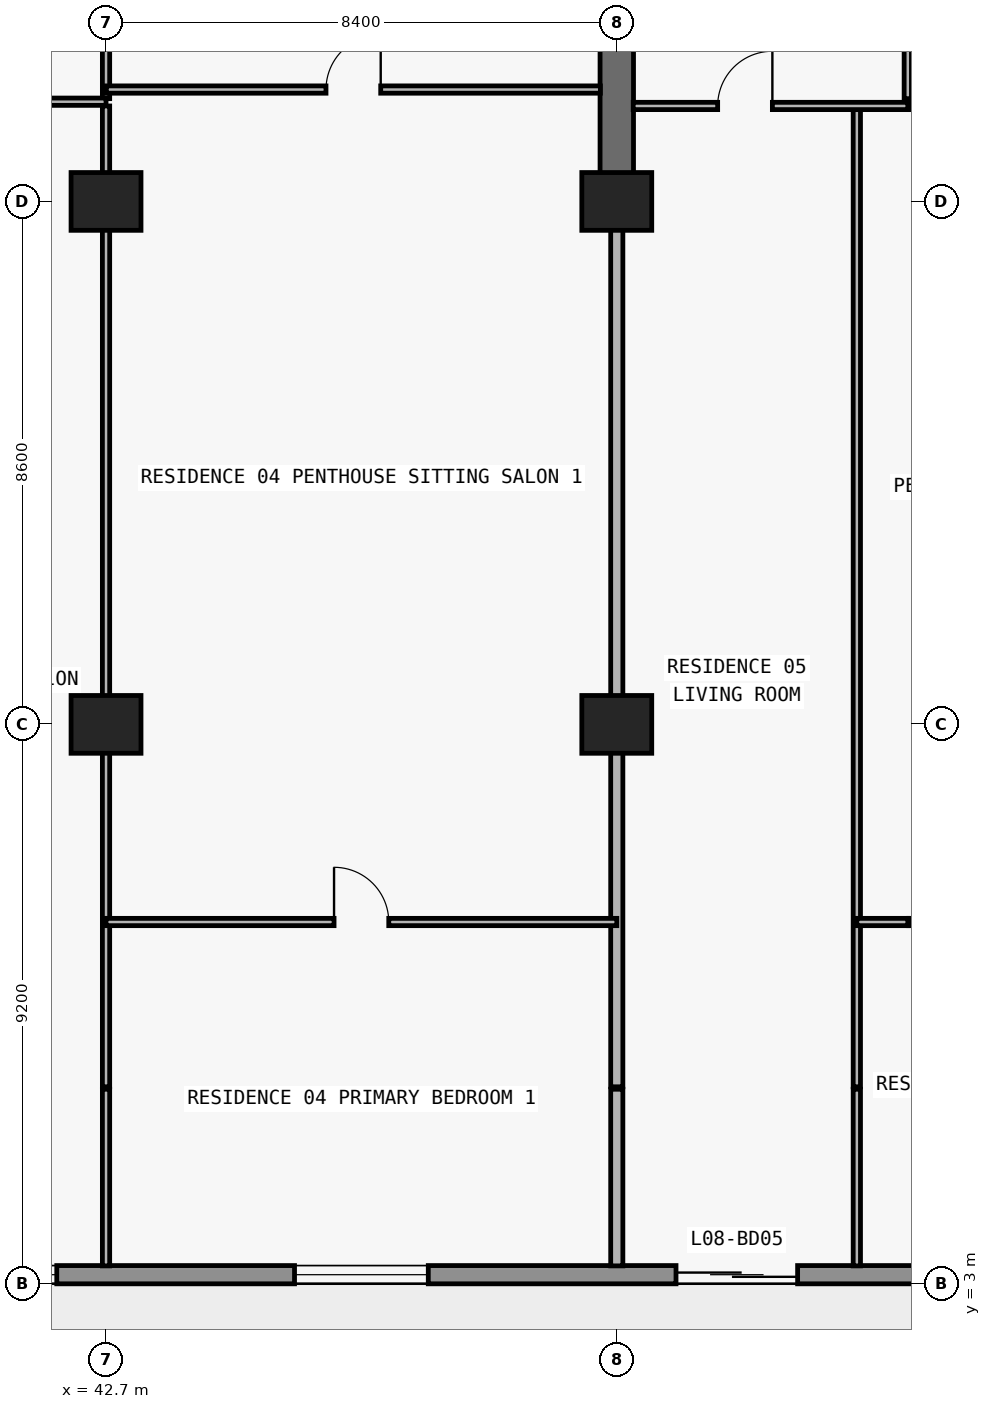
"""IFC4 building model, lengths in metres.
Left out: names, types, materials, properties, quantities, classifications, styles, units other than length and angle.
Written with IfcOpenShell. Run it as: python <this file> out.ifc"""

import sys

from ifc_helpers import new_model, si_unit, direction, frame, frame_2d, origin, origin_2d, place, context, subcontext, project, spatial, rectangle, extrude, element, fill, save


model = new_model("IFC4")
c1 = context("Model", 3, precision=1e-05, world=origin(), true_north=direction((0.0, 1.0)))
c2 = subcontext(c1, "Body", "Model", "MODEL_VIEW")
j1 = project(units=[si_unit("LENGTHUNIT", "METRE"), si_unit("PLANEANGLEUNIT", "RADIAN")], contexts=[c1])
p1 = place(None, origin())
s1 = spatial("IfcSite", under=j1, at=p1, CompositionType="ELEMENT")
p2 = place(p1, origin())
s2 = spatial("IfcBuilding", under=s1, at=p2, CompositionType="ELEMENT")
p3 = place(p2, frame((0.0, 0.0, 36.6)))
s3 = spatial("IfcBuildingStorey", under=s2, at=p3, CompositionType="ELEMENT", Elevation=36.6)
for number, where, z_axis, x_axis in (
    (1, (42.7, 12.2, 0.0), (0.0, 0.0, 1.0), (1.0, 0.0, 0.0)),
    (2, (51.1, 12.2, 0.0), (0.0, 0.0, 1.0), (1.0, 0.0, 0.0)),
    (3, (42.7, 20.8, 0.0), (0.0, 0.0, 1.0), (1.0, 0.0, 0.0)),
    (4, (51.1, 20.8, 0.0), (0.0, 0.0, 1.0), (1.0, 0.0, 0.0)),
):
    element("IfcColumn", number, at=place(p3, frame(where, z_axis=z_axis, x_axis=x_axis)), inside=s3, PredefinedType="COLUMN", context=c2, shape_type="SweptSolid", body=[
        extrude(rectangle(XDim=1.15, YDim=0.95, at=origin_2d()), origin(), (0.0, 0.0, 1.0), 3.05),
    ])
p4 = place(p3, frame((51.1, 20.8, 0.0), z_axis=(0.0, 0.0, 1.0), x_axis=(0.0, 1.0, 0.0)))
e5 = element("IfcWall", 5, at=p4, inside=s3, PredefinedType="SHEAR", context=c2, shape_type="SweptSolid", body=[
    extrude(rectangle(XDim=8.6, YDim=0.55, at=frame_2d((4.3, 0.0))), origin(), (0.0, 0.0, 1.0), 3.05),
])
p5 = place(p3, frame((72.7, 3.15, 0.0), z_axis=(0.0, 0.0, 1.0), x_axis=(-1.0, 0.0, 0.0)))
e6 = element("IfcWall", 6, at=p5, inside=s3, PredefinedType="STANDARD", context=c2, shape_type="SweptSolid", body=[
    extrude(rectangle(XDim=67.6, YDim=0.3, at=frame_2d((33.8, 0.0))), origin(), (0.0, 0.0, 1.0), 3.05),
])
p6 = place(p5, frame((59.826, 0.0, 0.0)))
e7 = element("IfcOpeningElement", 7, at=p6, cuts=e6, PredefinedType="OPENING", context=c2, shape_type="SweptSolid", body=[
    extrude(rectangle(XDim=2.0, YDim=2.3, at=frame_2d((1.0, 1.15))), frame((0.0, 0.16, 0.0), z_axis=(0.0, -1.0, 0.0), x_axis=(1.0, 0.0, 0.0)), (0.0, 0.0, 1.0), 0.32),
])
p7 = place(p5, frame((55.526, 0.0, 0.85)))
e8 = element("IfcOpeningElement", 8, at=p7, cuts=e6, PredefinedType="OPENING", context=c2, shape_type="SweptSolid", body=[
    extrude(rectangle(XDim=2.2, YDim=1.55, at=frame_2d((1.1, 0.775))), frame((0.0, 0.16, 0.0), z_axis=(0.0, -1.0, 0.0), x_axis=(1.0, 0.0, 0.0)), (0.0, 0.0, 1.0), 0.32),
])
p8 = place(p5, frame((51.09, 0.0, 0.0)))
e9 = element("IfcOpeningElement", 9, at=p8, cuts=e6, PredefinedType="OPENING", context=c2, shape_type="SweptSolid", body=[
    extrude(rectangle(XDim=2.0, YDim=2.3, at=frame_2d((1.0, 1.15))), frame((0.0, 0.16, 0.0), z_axis=(0.0, -1.0, 0.0), x_axis=(1.0, 0.0, 0.0)), (0.0, 0.0, 1.0), 0.32),
])
p9 = place(p5, frame((46.99, 0.0, 0.85)))
e10 = element("IfcOpeningElement", 10, at=p9, cuts=e6, PredefinedType="OPENING", context=c2, shape_type="SweptSolid", body=[
    extrude(rectangle(XDim=1.8, YDim=1.55, at=frame_2d((0.9, 0.775))), frame((0.0, 0.16, 0.0), z_axis=(0.0, -1.0, 0.0), x_axis=(1.0, 0.0, 0.0)), (0.0, 0.0, 1.0), 0.32),
])
p10 = place(p5, frame((43.026, 0.0, 0.0)))
e11 = element("IfcOpeningElement", 11, at=p10, cuts=e6, PredefinedType="OPENING", context=c2, shape_type="SweptSolid", body=[
    extrude(rectangle(XDim=2.0, YDim=2.3, at=frame_2d((1.0, 1.15))), frame((0.0, 0.16, 0.0), z_axis=(0.0, -1.0, 0.0), x_axis=(1.0, 0.0, 0.0)), (0.0, 0.0, 1.0), 0.32),
])
p11 = place(p5, frame((38.726, 0.0, 0.85)))
e12 = element("IfcOpeningElement", 12, at=p11, cuts=e6, PredefinedType="OPENING", context=c2, shape_type="SweptSolid", body=[
    extrude(rectangle(XDim=2.2, YDim=1.55, at=frame_2d((1.1, 0.775))), frame((0.0, 0.16, 0.0), z_axis=(0.0, -1.0, 0.0), x_axis=(1.0, 0.0, 0.0)), (0.0, 0.0, 1.0), 0.32),
])
p12 = place(p5, frame((34.69, 0.0, 0.0)))
e13 = element("IfcOpeningElement", 13, at=p12, cuts=e6, PredefinedType="OPENING", context=c2, shape_type="SweptSolid", body=[
    extrude(rectangle(XDim=2.0, YDim=2.3, at=frame_2d((1.0, 1.15))), frame((0.0, 0.16, 0.0), z_axis=(0.0, -1.0, 0.0), x_axis=(1.0, 0.0, 0.0)), (0.0, 0.0, 1.0), 0.32),
])
p13 = place(p5, frame((30.81, 0.0, 0.65)))
e14 = element("IfcOpeningElement", 14, at=p13, cuts=e6, PredefinedType="OPENING", context=c2, shape_type="SweptSolid", body=[
    extrude(rectangle(XDim=2.6, YDim=1.85, at=frame_2d((1.3, 0.925))), frame((0.0, 0.16, 0.0), z_axis=(0.0, -1.0, 0.0), x_axis=(1.0, 0.0, 0.0)), (0.0, 0.0, 1.0), 0.32),
])
p14 = place(p5, frame((24.7, 0.0, 0.85)))
e15 = element("IfcOpeningElement", 15, at=p14, cuts=e6, PredefinedType="OPENING", context=c2, shape_type="SweptSolid", body=[
    extrude(rectangle(XDim=2.2, YDim=1.55, at=frame_2d((1.1, 0.775))), frame((0.0, 0.16, 0.0), z_axis=(0.0, -1.0, 0.0), x_axis=(1.0, 0.0, 0.0)), (0.0, 0.0, 1.0), 0.32),
])
p15 = place(p5, frame((18.626, 0.0, 0.0)))
e16 = element("IfcOpeningElement", 16, at=p15, cuts=e6, PredefinedType="OPENING", context=c2, shape_type="SweptSolid", body=[
    extrude(rectangle(XDim=2.0, YDim=2.3, at=frame_2d((1.0, 1.15))), frame((0.0, 0.16, 0.0), z_axis=(0.0, -1.0, 0.0), x_axis=(1.0, 0.0, 0.0)), (0.0, 0.0, 1.0), 0.32),
])
p16 = place(p5, frame((14.326, 0.0, 0.85)))
e17 = element("IfcOpeningElement", 17, at=p16, cuts=e6, PredefinedType="OPENING", context=c2, shape_type="SweptSolid", body=[
    extrude(rectangle(XDim=2.2, YDim=1.55, at=frame_2d((1.1, 0.775))), frame((0.0, 0.16, 0.0), z_axis=(0.0, -1.0, 0.0), x_axis=(1.0, 0.0, 0.0)), (0.0, 0.0, 1.0), 0.32),
])
p17 = place(p5, frame((9.89, 0.0, 0.0)))
e18 = element("IfcOpeningElement", 18, at=p17, cuts=e6, PredefinedType="OPENING", context=c2, shape_type="SweptSolid", body=[
    extrude(rectangle(XDim=2.0, YDim=2.3, at=frame_2d((1.0, 1.15))), frame((0.0, 0.16, 0.0), z_axis=(0.0, -1.0, 0.0), x_axis=(1.0, 0.0, 0.0)), (0.0, 0.0, 1.0), 0.32),
])
p18 = place(p5, frame((5.79, 0.0, 0.85)))
e19 = element("IfcOpeningElement", 19, at=p18, cuts=e6, PredefinedType="OPENING", context=c2, shape_type="SweptSolid", body=[
    extrude(rectangle(XDim=1.8, YDim=1.55, at=frame_2d((0.9, 0.775))), frame((0.0, 0.16, 0.0), z_axis=(0.0, -1.0, 0.0), x_axis=(1.0, 0.0, 0.0)), (0.0, 0.0, 1.0), 0.32),
])
p19 = place(p3, frame((42.7, 3.295, 0.0), z_axis=(0.0, 0.0, 1.0), x_axis=(0.0, 1.0, 0.0)))
e20 = element("IfcWall", 20, at=p19, inside=s3, PredefinedType="PARTITIONING", context=c2, shape_type="SweptSolid", body=[
    extrude(rectangle(XDim=2.905, YDim=0.12, at=frame_2d((1.453, 0.0))), origin(), (0.0, 0.0, 1.0), 3.05),
])
p20 = place(p3, frame((42.7, 6.24, 0.0), z_axis=(0.0, 0.0, 1.0), x_axis=(0.0, 1.0, 0.0)))
e21 = element("IfcWall", 21, at=p20, inside=s3, PredefinedType="PARTITIONING", context=c2, shape_type="SweptSolid", body=[
    extrude(rectangle(XDim=16.13, YDim=0.12, at=frame_2d((8.065, 0.0))), origin(), (0.0, 0.0, 1.0), 2.11),
])
p21 = place(p3, frame((42.7, 22.49, 0.0), z_axis=(0.0, 0.0, 1.0), x_axis=(0.0, 1.0, 0.0)))
e22 = element("IfcWall", 22, at=p21, inside=s3, PredefinedType="PARTITIONING", context=c2, shape_type="SweptSolid", body=[
    extrude(rectangle(XDim=4.69, YDim=0.12, at=frame_2d((2.345, 0.0))), origin(), (0.0, 0.0, 1.0), 2.11),
])
p22 = place(p21, frame((1.9, 0.0, 0.0)))
e23 = element("IfcOpeningElement", 23, at=p22, cuts=e22, PredefinedType="OPENING", context=c2, shape_type="SweptSolid", body=[
    extrude(rectangle(XDim=0.9, YDim=2.06, at=frame_2d((0.45, 1.03))), frame((0.0, 0.07, 0.0), z_axis=(0.0, -1.0, 0.0), x_axis=(1.0, 0.0, 0.0)), (0.0, 0.0, 1.0), 0.14),
])
p23 = place(p3, frame((51.1, 3.295, 0.0), z_axis=(0.0, 0.0, 1.0), x_axis=(0.0, 1.0, 0.0)))
e24 = element("IfcWall", 24, at=p23, inside=s3, PredefinedType="PARTITIONING", context=c2, shape_type="SweptSolid", body=[
    extrude(rectangle(XDim=2.905, YDim=0.2, at=frame_2d((1.453, 0.0))), origin(), (0.0, 0.0, 1.0), 3.05),
])
p24 = place(p3, frame((51.1, 6.24, 0.0), z_axis=(0.0, 0.0, 1.0), x_axis=(0.0, 1.0, 0.0)))
e25 = element("IfcWall", 25, at=p24, inside=s3, PredefinedType="PARTITIONING", context=c2, shape_type="SweptSolid", body=[
    extrude(rectangle(XDim=14.555, YDim=0.2, at=frame_2d((7.277, 0.0))), origin(), (0.0, 0.0, 1.0), 2.11),
])
p25 = place(p3, frame((55.048, 3.295, 0.0), z_axis=(0.0, 0.0, 1.0), x_axis=(0.0, 1.0, 0.0)))
e26 = element("IfcWall", 26, at=p25, inside=s3, PredefinedType="PARTITIONING", context=c2, shape_type="SweptSolid", body=[
    extrude(rectangle(XDim=2.905, YDim=0.12, at=frame_2d((1.453, 0.0))), origin(), (0.0, 0.0, 1.0), 3.05),
])
p26 = place(p3, frame((55.048, 6.24, 0.0), z_axis=(0.0, 0.0, 1.0), x_axis=(0.0, 1.0, 0.0)))
e27 = element("IfcWall", 27, at=p26, inside=s3, PredefinedType="PARTITIONING", context=c2, shape_type="SweptSolid", body=[
    extrude(rectangle(XDim=16.13, YDim=0.12, at=frame_2d((8.065, 0.0))), origin(), (0.0, 0.0, 1.0), 3.05),
])
p27 = place(p3, frame((55.886, 22.49, 0.0), z_axis=(0.0, 0.0, 1.0), x_axis=(0.0, 1.0, 0.0)))
e28 = element("IfcWall", 28, at=p27, inside=s3, PredefinedType="PARTITIONING", context=c2, shape_type="SweptSolid", body=[
    extrude(rectangle(XDim=4.69, YDim=0.12, at=frame_2d((2.345, 0.0))), origin(), (0.0, 0.0, 1.0), 3.05),
])
p28 = place(p27, frame((1.895, 0.0, 0.0)))
e29 = element("IfcOpeningElement", 29, at=p28, cuts=e28, PredefinedType="OPENING", context=c2, shape_type="SweptSolid", body=[
    extrude(rectangle(XDim=0.9, YDim=2.15, at=frame_2d((0.45, 1.075))), frame((0.0, 0.07, 0.0), z_axis=(0.0, -1.0, 0.0), x_axis=(1.0, 0.0, 0.0)), (0.0, 0.0, 1.0), 0.14),
])
p29 = place(p3, frame((42.7, 8.95, 0.0), z_axis=(0.0, 0.0, 1.0), x_axis=(1.0, 0.0, 0.0)))
e30 = element("IfcWall", 30, at=p29, inside=s3, PredefinedType="PARTITIONING", context=c2, shape_type="SweptSolid", body=[
    extrude(rectangle(XDim=8.4, YDim=0.12, at=frame_2d((4.2, 0.0))), origin(), (0.0, 0.0, 1.0), 3.05),
])
p30 = place(p29, frame((3.75, 0.0, 0.0)))
e31 = element("IfcOpeningElement", 31, at=p30, cuts=e30, PredefinedType="OPENING", context=c2, shape_type="SweptSolid", body=[
    extrude(rectangle(XDim=0.9, YDim=2.15, at=frame_2d((0.45, 1.075))), frame((0.0, 0.07, 0.0), z_axis=(0.0, -1.0, 0.0), x_axis=(1.0, 0.0, 0.0)), (0.0, 0.0, 1.0), 0.14),
])
p31 = place(p3, frame((55.048, 8.95, 0.0), z_axis=(0.0, 0.0, 1.0), x_axis=(1.0, 0.0, 0.0)))
e32 = element("IfcWall", 32, at=p31, inside=s3, PredefinedType="PARTITIONING", context=c2, shape_type="SweptSolid", body=[
    extrude(rectangle(XDim=0.838, YDim=0.12, at=frame_2d((0.419, 0.0))), origin(), (0.0, 0.0, 1.0), 3.05),
])
p32 = place(p3, frame((55.9, 8.95, 0.0), z_axis=(0.0, 0.0, 1.0), x_axis=(1.0, 0.0, 0.0)))
e33 = element("IfcWall", 33, at=p32, inside=s3, PredefinedType="PARTITIONING", context=c2, shape_type="SweptSolid", body=[
    extrude(rectangle(XDim=3.6, YDim=0.12, at=frame_2d((1.8, 0.0))), origin(), (0.0, 0.0, 1.0), 3.05),
])
p33 = place(p32, frame((1.35, 0.0, 0.0)))
e34 = element("IfcOpeningElement", 34, at=p33, cuts=e33, PredefinedType="OPENING", context=c2, shape_type="SweptSolid", body=[
    extrude(rectangle(XDim=0.9, YDim=2.15, at=frame_2d((0.45, 1.075))), frame((0.0, 0.07, 0.0), z_axis=(0.0, -1.0, 0.0), x_axis=(1.0, 0.0, 0.0)), (0.0, 0.0, 1.0), 0.14),
])
p34 = place(p3, frame((51.37, 22.37, 0.0), z_axis=(0.0, 0.0, 1.0), x_axis=(1.0, 0.0, 0.0)))
e35 = element("IfcWall", 35, at=p34, inside=s3, PredefinedType="PARTITIONING", context=c2, shape_type="SweptSolid", body=[
    extrude(rectangle(XDim=4.516, YDim=0.12, at=frame_2d((2.258, 0.0))), origin(), (0.0, 0.0, 1.0), 3.05),
])
p35 = place(p34, frame((1.389, 0.0, 0.0)))
e36 = element("IfcOpeningElement", 36, at=p35, cuts=e35, PredefinedType="OPENING", context=c2, shape_type="SweptSolid", body=[
    extrude(rectangle(XDim=0.9, YDim=2.15, at=frame_2d((0.45, 1.075))), frame((0.0, 0.07, 0.0), z_axis=(0.0, -1.0, 0.0), x_axis=(1.0, 0.0, 0.0)), (0.0, 0.0, 1.0), 0.14),
])
p36 = place(p3, frame((55.9, 22.37, 0.0), z_axis=(0.0, 0.0, 1.0), x_axis=(1.0, 0.0, 0.0)))
e37 = element("IfcWall", 37, at=p36, inside=s3, PredefinedType="PARTITIONING", context=c2, shape_type="SweptSolid", body=[
    extrude(rectangle(XDim=3.6, YDim=0.12, at=frame_2d((1.8, 0.0))), origin(), (0.0, 0.0, 1.0), 3.05),
])
p37 = place(p36, frame((1.35, 0.0, 0.0)))
e38 = element("IfcOpeningElement", 38, at=p37, cuts=e37, PredefinedType="OPENING", context=c2, shape_type="SweptSolid", body=[
    extrude(rectangle(XDim=0.9, YDim=2.15, at=frame_2d((0.45, 1.075))), frame((0.0, 0.07, 0.0), z_axis=(0.0, -1.0, 0.0), x_axis=(1.0, 0.0, 0.0)), (0.0, 0.0, 1.0), 0.14),
])
p38 = place(p3, frame((35.1, 22.44, 0.0), z_axis=(0.0, 0.0, 1.0), x_axis=(1.0, 0.0, 0.0)))
e39 = element("IfcWall", 39, at=p38, inside=s3, PredefinedType="PARTITIONING", context=c2, shape_type="SweptSolid", body=[
    extrude(rectangle(XDim=7.6, YDim=0.12, at=frame_2d((3.8, 0.0))), origin(), (0.0, 0.0, 1.0), 3.05),
])
p39 = place(p38, frame((3.35, 0.0, 0.0)))
e40 = element("IfcOpeningElement", 40, at=p39, cuts=e39, PredefinedType="OPENING", context=c2, shape_type="SweptSolid", body=[
    extrude(rectangle(XDim=0.9, YDim=2.15, at=frame_2d((0.45, 1.075))), frame((0.0, 0.07, 0.0), z_axis=(0.0, -1.0, 0.0), x_axis=(1.0, 0.0, 0.0)), (0.0, 0.0, 1.0), 0.14),
])
p40 = place(p3, frame((42.705, 22.64, 0.0), z_axis=(0.0, 0.0, 1.0), x_axis=(1.0, 0.0, 0.0)))
e41 = element("IfcWall", 41, at=p40, inside=s3, PredefinedType="PARTITIONING", context=c2, shape_type="SweptSolid", body=[
    extrude(rectangle(XDim=8.125, YDim=0.12, at=frame_2d((4.062, 0.0))), origin(), (0.0, 0.0, 1.0), 3.05),
])
p41 = place(p40, frame((3.613, 0.0, 0.0)))
e42 = element("IfcOpeningElement", 42, at=p41, cuts=e41, PredefinedType="OPENING", context=c2, shape_type="SweptSolid", body=[
    extrude(rectangle(XDim=0.9, YDim=2.15, at=frame_2d((0.45, 1.075))), frame((0.0, 0.07, 0.0), z_axis=(0.0, -1.0, 0.0), x_axis=(1.0, 0.0, 0.0)), (0.0, 0.0, 1.0), 0.14),
])
p42 = place(p13, origin())
e43 = element("IfcWindow", 43, at=p42, inside=s3, PartitioningType="SINGLE_PANEL", PredefinedType="WINDOW", context=c2, shape_type="SweptSolid", body=[
    extrude(rectangle(XDim=2.6, YDim=1.85, at=frame_2d((1.3, 0.925))), frame((0.0, 0.03, 0.0), z_axis=(0.0, -1.0, 0.0), x_axis=(1.0, 0.0, 0.0)), (0.0, 0.0, 1.0), 0.06),
])
fill(e14, e43)
p43 = place(p14, origin())
e44 = element("IfcWindow", 44, at=p43, inside=s3, PartitioningType="SINGLE_PANEL", PredefinedType="WINDOW", context=c2, shape_type="SweptSolid", body=[
    extrude(rectangle(XDim=2.2, YDim=1.55, at=frame_2d((1.1, 0.775))), frame((0.0, 0.03, 0.0), z_axis=(0.0, -1.0, 0.0), x_axis=(1.0, 0.0, 0.0)), (0.0, 0.0, 1.0), 0.06),
])
fill(e15, e44)
p44 = place(p15, origin())
e45 = element("IfcDoor", 45, at=p44, inside=s3, OperationType="DOUBLE_DOOR_SLIDING", PredefinedType="DOOR", context=c2, shape_type="SweptSolid", body=[
    extrude(rectangle(XDim=2.0, YDim=2.3, at=frame_2d((1.0, 1.15))), frame((0.0, 0.025, 0.0), z_axis=(0.0, -1.0, 0.0), x_axis=(1.0, 0.0, 0.0)), (0.0, 0.0, 1.0), 0.05),
])
fill(e16, e45)
p45 = place(p41, origin())
e46 = element("IfcDoor", 46, at=p45, inside=s3, OperationType="SINGLE_SWING_RIGHT", PredefinedType="DOOR", context=c2, shape_type="SweptSolid", body=[
    extrude(rectangle(XDim=0.9, YDim=2.15, at=frame_2d((0.45, 1.075))), frame((0.0, 0.025, 0.0), z_axis=(0.0, -1.0, 0.0), x_axis=(1.0, 0.0, 0.0)), (0.0, 0.0, 1.0), 0.05),
])
fill(e42, e46)
p46 = place(p30, origin())
e47 = element("IfcDoor", 47, at=p46, inside=s3, OperationType="SINGLE_SWING_LEFT", PredefinedType="DOOR", context=c2, shape_type="SweptSolid", body=[
    extrude(rectangle(XDim=0.9, YDim=2.15, at=frame_2d((0.45, 1.075))), frame((0.0, 0.025, 0.0), z_axis=(0.0, -1.0, 0.0), x_axis=(1.0, 0.0, 0.0)), (0.0, 0.0, 1.0), 0.05),
])
fill(e31, e47)
p47 = place(p35, origin())
e48 = element("IfcDoor", 48, at=p47, inside=s3, OperationType="SINGLE_SWING_RIGHT", PredefinedType="DOOR", context=c2, shape_type="SweptSolid", body=[
    extrude(rectangle(XDim=0.9, YDim=2.15, at=frame_2d((0.45, 1.075))), frame((0.0, 0.025, 0.0), z_axis=(0.0, -1.0, 0.0), x_axis=(1.0, 0.0, 0.0)), (0.0, 0.0, 1.0), 0.05),
])
fill(e36, e48)
save(model, sys.argv[1])
